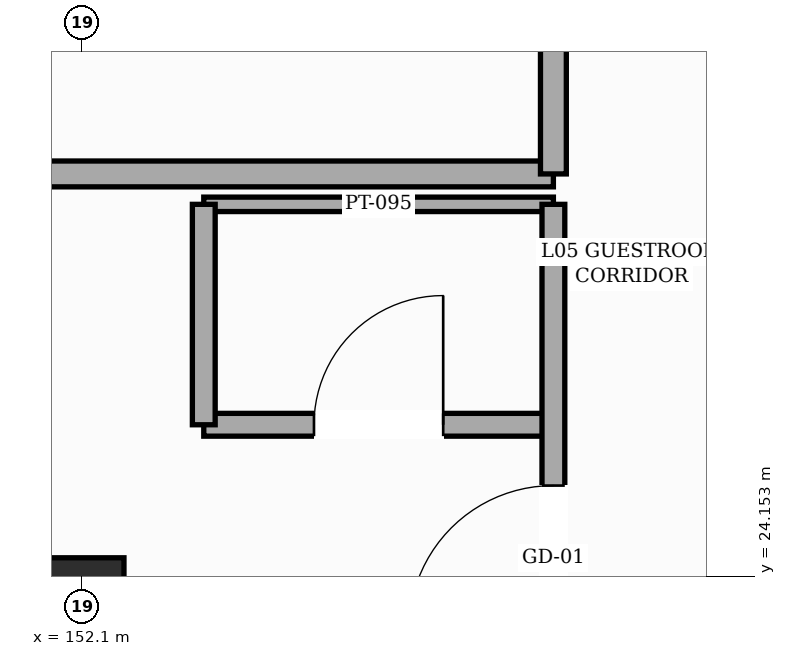
"""IFC4 building model, lengths in metres.
Left out: names, types, materials, properties, quantities, classifications, styles, units other than length and angle.
Written with IfcOpenShell. Run it as: python <this file> out.ifc"""

import sys

from ifc_helpers import new_model, si_unit, direction, frame, frame_2d, origin, origin_2d, place, context, subcontext, project, spatial, rectangle, hollow_rectangle, extrude, element, fill, save


model = new_model("IFC4")
c1 = context("Model", 3, precision=1e-05, world=origin(), true_north=direction((0.0, 1.0)))
c2 = subcontext(c1, "Body", "Model", "MODEL_VIEW")
j1 = project(units=[si_unit("LENGTHUNIT", "METRE"), si_unit("PLANEANGLEUNIT", "RADIAN")], contexts=[c1])
p1 = place(None, origin())
s1 = spatial("IfcSite", under=j1, at=p1, CompositionType="ELEMENT")
p2 = place(p1, origin())
s2 = spatial("IfcBuilding", under=s1, at=p2, CompositionType="ELEMENT")
p3 = place(p2, frame((0.0, 0.0, 24.6)))
s3 = spatial("IfcBuildingStorey", under=s2, at=p3, CompositionType="ELEMENT", Elevation=24.6)
p4 = place(p3, frame((152.1, 24.0, 0.0), z_axis=(0.0, 0.0, 1.0), x_axis=(1.0, 0.0, 0.0)))
e1 = element("IfcColumn", 1, at=p4, inside=s3, PredefinedType="COLUMN", context=c2, shape_type="SweptSolid", body=[
    extrude(hollow_rectangle(XDim=0.55, YDim=0.55, WallThickness=0.022, InnerFilletRadius=0.022, OuterFilletRadius=0.044, at=origin_2d()), origin(), (0.0, 0.0, 1.0), 3.6),
])
p5 = place(p3, frame((152.9, 25.15, 0.0), z_axis=(0.0, 0.0, 1.0), x_axis=(1.0, 0.0, 0.0)))
e2 = element("IfcWall", 2, at=p5, inside=s3, PredefinedType="PARTITIONING", context=c2, shape_type="SweptSolid", body=[
    extrude(rectangle(XDim=2.3, YDim=0.15, at=frame_2d((1.15, 0.0))), origin(), (0.0, 0.0, 1.0), 3.365),
])
p6 = place(p5, frame((0.725, 0.0, 0.0)))
e3 = element("IfcOpeningElement", 3, at=p6, cuts=e2, PredefinedType="OPENING", context=c2, shape_type="SweptSolid", body=[
    extrude(rectangle(XDim=0.85, YDim=2.1, at=frame_2d((0.425, 1.05))), frame((0.0, 0.085, 0.0), z_axis=(0.0, -1.0, 0.0), x_axis=(1.0, 0.0, 0.0)), (0.0, 0.0, 1.0), 0.17),
])
p7 = place(p3, frame((152.9, 26.6, 0.0), z_axis=(0.0, 0.0, 1.0), x_axis=(1.0, 0.0, 0.0)))
e4 = element("IfcWall", 4, at=p7, inside=s3, PredefinedType="PARTITIONING", context=c2, shape_type="SweptSolid", body=[
    extrude(rectangle(XDim=2.3, YDim=0.095, at=frame_2d((1.15, 0.0))), origin(), (0.0, 0.0, 1.0), 3.365),
])
p8 = place(p3, frame((147.8, 26.8, 0.0), z_axis=(0.0, 0.0, 1.0), x_axis=(1.0, 0.0, 0.0)))
e5 = element("IfcWall", 5, at=p8, inside=s3, PredefinedType="PARTITIONING", context=c2, shape_type="SweptSolid", body=[
    extrude(rectangle(XDim=7.4, YDim=0.17, at=frame_2d((3.7, 0.0))), origin(), (0.0, 0.0, 1.0), 3.365),
])
p9 = place(p3, frame((152.9, 25.15, 0.0), z_axis=(0.0, 0.0, 1.0), x_axis=(0.0, 1.0, 0.0)))
e6 = element("IfcWall", 6, at=p9, inside=s3, PredefinedType="PARTITIONING", context=c2, shape_type="SweptSolid", body=[
    extrude(rectangle(XDim=1.45, YDim=0.15, at=frame_2d((0.725, 0.0))), origin(), (0.0, 0.0, 1.0), 3.365),
])
p10 = place(p3, frame((155.2, 1.0, 0.0), z_axis=(0.0, 0.0, 1.0), x_axis=(0.0, 1.0, 0.0)))
e7 = element("IfcWall", 7, at=p10, inside=s3, PredefinedType="PARTITIONING", context=c2, shape_type="SweptSolid", body=[
    extrude(rectangle(XDim=25.6, YDim=0.15, at=frame_2d((12.8, 0.0))), origin(), (0.0, 0.0, 1.0), 3.365),
])
p11 = place(p10, frame((0.325, 0.0, 0.0)))
e8 = element("IfcOpeningElement", 8, at=p11, cuts=e7, PredefinedType="OPENING", context=c2, shape_type="SweptSolid", body=[
    extrude(rectangle(XDim=1.1, YDim=2.2, at=frame_2d((0.55, 1.1))), frame((0.0, 0.085, 0.0), z_axis=(0.0, -1.0, 0.0), x_axis=(1.0, 0.0, 0.0)), (0.0, 0.0, 1.0), 0.17),
])
p12 = place(p10, frame((3.6, 0.0, 0.0)))
e9 = element("IfcOpeningElement", 9, at=p12, cuts=e7, PredefinedType="OPENING", context=c2, shape_type="SweptSolid", body=[
    extrude(rectangle(XDim=0.95, YDim=2.15, at=frame_2d((0.475, 1.075))), frame((0.0, 0.085, 0.0), z_axis=(0.0, -1.0, 0.0), x_axis=(1.0, 0.0, 0.0)), (0.0, 0.0, 1.0), 0.17),
])
p13 = place(p10, frame((6.8, 0.0, 0.0)))
e10 = element("IfcOpeningElement", 10, at=p13, cuts=e7, PredefinedType="OPENING", context=c2, shape_type="SweptSolid", body=[
    extrude(rectangle(XDim=0.95, YDim=2.15, at=frame_2d((0.475, 1.075))), frame((0.0, 0.085, 0.0), z_axis=(0.0, -1.0, 0.0), x_axis=(1.0, 0.0, 0.0)), (0.0, 0.0, 1.0), 0.17),
])
p14 = place(p10, frame((10.0, 0.0, 0.0)))
e11 = element("IfcOpeningElement", 11, at=p14, cuts=e7, PredefinedType="OPENING", context=c2, shape_type="SweptSolid", body=[
    extrude(rectangle(XDim=0.95, YDim=2.15, at=frame_2d((0.475, 1.075))), frame((0.0, 0.085, 0.0), z_axis=(0.0, -1.0, 0.0), x_axis=(1.0, 0.0, 0.0)), (0.0, 0.0, 1.0), 0.17),
])
p15 = place(p10, frame((13.2, 0.0, 0.0)))
e12 = element("IfcOpeningElement", 12, at=p15, cuts=e7, PredefinedType="OPENING", context=c2, shape_type="SweptSolid", body=[
    extrude(rectangle(XDim=0.95, YDim=2.15, at=frame_2d((0.475, 1.075))), frame((0.0, 0.085, 0.0), z_axis=(0.0, -1.0, 0.0), x_axis=(1.0, 0.0, 0.0)), (0.0, 0.0, 1.0), 0.17),
])
p16 = place(p10, frame((16.4, 0.0, 0.0)))
e13 = element("IfcOpeningElement", 13, at=p16, cuts=e7, PredefinedType="OPENING", context=c2, shape_type="SweptSolid", body=[
    extrude(rectangle(XDim=0.95, YDim=2.15, at=frame_2d((0.475, 1.075))), frame((0.0, 0.085, 0.0), z_axis=(0.0, -1.0, 0.0), x_axis=(1.0, 0.0, 0.0)), (0.0, 0.0, 1.0), 0.17),
])
p17 = place(p10, frame((19.6, 0.0, 0.0)))
e14 = element("IfcOpeningElement", 14, at=p17, cuts=e7, PredefinedType="OPENING", context=c2, shape_type="SweptSolid", body=[
    extrude(rectangle(XDim=0.95, YDim=2.15, at=frame_2d((0.475, 1.075))), frame((0.0, 0.085, 0.0), z_axis=(0.0, -1.0, 0.0), x_axis=(1.0, 0.0, 0.0)), (0.0, 0.0, 1.0), 0.17),
])
p18 = place(p10, frame((22.8, 0.0, 0.0)))
e15 = element("IfcOpeningElement", 15, at=p18, cuts=e7, PredefinedType="OPENING", context=c2, shape_type="SweptSolid", body=[
    extrude(rectangle(XDim=0.95, YDim=2.15, at=frame_2d((0.475, 1.075))), frame((0.0, 0.085, 0.0), z_axis=(0.0, -1.0, 0.0), x_axis=(1.0, 0.0, 0.0)), (0.0, 0.0, 1.0), 0.17),
])
p19 = place(p3, frame((155.2, 26.8, 0.0), z_axis=(0.0, 0.0, 1.0), x_axis=(0.0, 1.0, 0.0)))
e16 = element("IfcWall", 16, at=p19, inside=s3, PredefinedType="PARTITIONING", context=c2, shape_type="SweptSolid", body=[
    extrude(rectangle(XDim=3.4, YDim=0.17, at=frame_2d((1.7, 0.0))), origin(), (0.0, 0.0, 1.0), 3.365),
])
p20 = place(p19, frame((1.1, 0.0, 0.0)))
e17 = element("IfcOpeningElement", 17, at=p20, cuts=e16, PredefinedType="OPENING", context=c2, shape_type="SweptSolid", body=[
    extrude(rectangle(XDim=1.2, YDim=2.2, at=frame_2d((0.6, 1.1))), frame((0.0, 0.095, 0.0), z_axis=(0.0, -1.0, 0.0), x_axis=(1.0, 0.0, 0.0)), (0.0, 0.0, 1.0), 0.19),
])
p21 = place(p18, origin())
e18 = element("IfcDoor", 18, at=p21, inside=s3, OperationType="SINGLE_SWING_LEFT", PredefinedType="DOOR", context=c2, shape_type="SweptSolid", body=[
    extrude(rectangle(XDim=0.95, YDim=2.15, at=frame_2d((0.475, 1.075))), frame((0.0, 0.025, 0.0), z_axis=(0.0, -1.0, 0.0), x_axis=(1.0, 0.0, 0.0)), (0.0, 0.0, 1.0), 0.05),
])
fill(e15, e18)
p22 = place(p6, origin())
e19 = element("IfcDoor", 19, at=p22, inside=s3, OperationType="SINGLE_SWING_RIGHT", PredefinedType="DOOR", context=c2, shape_type="SweptSolid", body=[
    extrude(rectangle(XDim=0.85, YDim=2.1, at=frame_2d((0.425, 1.05))), frame((0.0, 0.025, 0.0), z_axis=(0.0, -1.0, 0.0), x_axis=(1.0, 0.0, 0.0)), (0.0, 0.0, 1.0), 0.05),
])
fill(e3, e19)
save(model, sys.argv[1])
